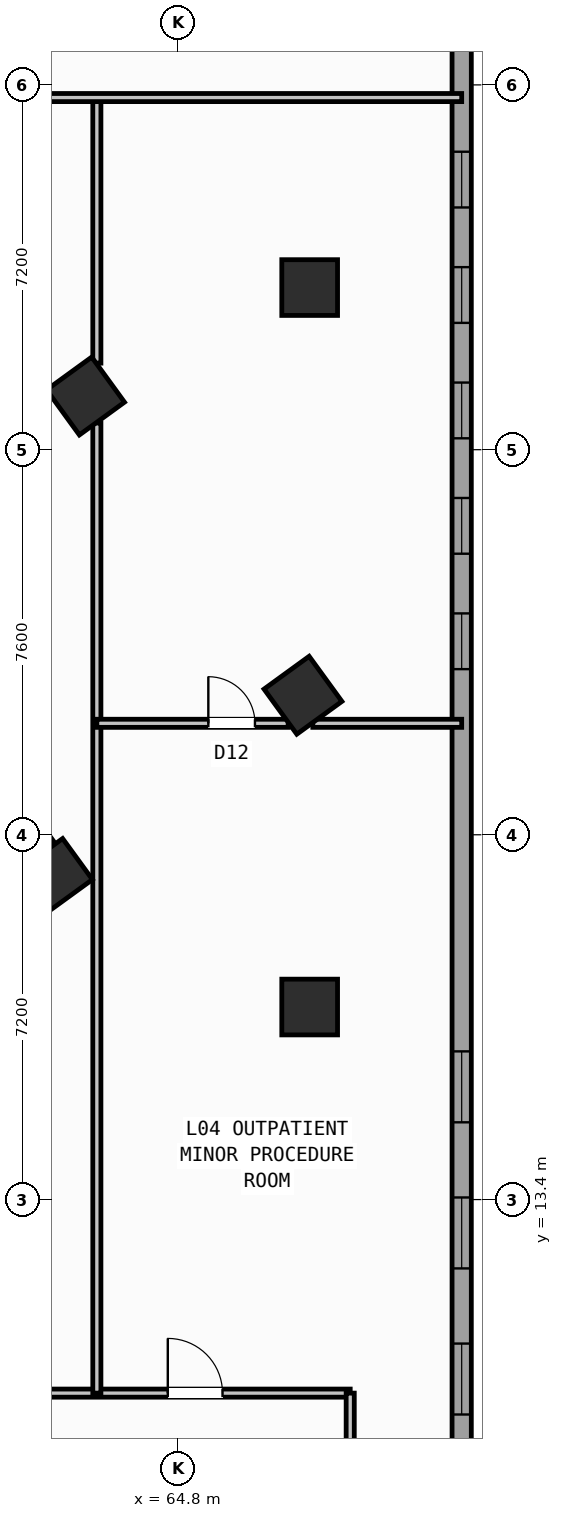
"""IFC4 building model, lengths in metres.
Left out: names, types, materials, properties, quantities, classifications, styles, units other than length and angle.
Written with IfcOpenShell. Run it as: python <this file> out.ifc"""

import sys

from ifc_helpers import new_model, si_unit, direction, frame, frame_2d, origin, origin_2d, place, context, subcontext, project, spatial, rectangle, hollow_rectangle, extrude, source, transform, mapped, element, fill, save


model = new_model("IFC4")
c1 = context("Model", 3, precision=1e-05, world=origin(), true_north=direction((0.0, 1.0)))
c2 = subcontext(c1, "Body", "Model", "MODEL_VIEW")
j1 = project(units=[si_unit("LENGTHUNIT", "METRE"), si_unit("PLANEANGLEUNIT", "RADIAN")], contexts=[c1])
p1 = place(None, origin())
s1 = spatial("IfcSite", under=j1, at=p1, CompositionType="ELEMENT")
p2 = place(p1, origin())
s2 = spatial("IfcBuilding", under=s1, at=p2, CompositionType="ELEMENT")
p3 = place(p2, frame((0.0, 0.0, 18.6)))
s3 = spatial("IfcBuildingStorey", under=s2, at=p3, CompositionType="ELEMENT", Elevation=18.6)
p4 = place(p3, frame((52.318, 13.11, 0.0), z_axis=(0.0, 0.0, 1.0), x_axis=(0.809019445368, 0.587781878776, 0.0)))
e1 = element("IfcWall", 1, at=p4, inside=s3, PredefinedType="SHEAR", context=c2, shape_type="SweptSolid", body=[
    extrude(rectangle(XDim=12.44, YDim=0.65, at=frame_2d((6.22, 0.0))), origin(), (0.0, 0.0, 1.0), 4.95),
])
m1 = source(origin(), c2, "Body", "SweptSolid", [
    extrude(hollow_rectangle(XDim=1.1, YDim=1.1, WallThickness=0.04, at=origin_2d()), origin(), (0.0, 0.0, 1.0), 5.4),
])
for number, where, z_axis, x_axis in (
    (2, (67.4, 17.2, 0.0), (0.0, 0.0, 1.0), (1.0, 0.0, 0.0)),
    (3, (67.4, 31.4, 0.0), (0.0, 0.0, 1.0), (1.0, 0.0, 0.0)),
    (4, (67.268, 23.354, 0.0), (0.0, 0.0, 1.0), (0.809, 0.588, 0.0)),
    (5, (62.977, 29.259, 0.0), (0.0, 0.0, 1.0), (0.809, 0.588, 0.0)),
):
    element("IfcColumn", number, at=place(p3, frame(where, z_axis=z_axis, x_axis=x_axis)), inside=s3, PredefinedType="COLUMN", context=c2, shape_type="MappedRepresentation", body=[
        mapped(m1, transform((0.0, 0.0, 0.0), scale=1.0)),
    ])
m2 = source(origin(), c2, "Body", "SweptSolid", [
    extrude(hollow_rectangle(XDim=1.0, YDim=1.0, WallThickness=0.04, at=origin_2d()), origin(), (0.0, 0.0, 1.0), 5.4),
])
p5 = place(p3, frame((62.414, 19.827, 0.0), z_axis=(0.0, 0.0, 1.0), x_axis=(0.809016994375, 0.587785252292, 0.0)))
e6 = element("IfcColumn", 6, at=p5, inside=s3, PredefinedType="COLUMN", context=c2, shape_type="MappedRepresentation", body=[
    mapped(m2, transform((0.0, 0.0, 0.0), scale=1.0)),
])
p6 = place(p3, frame((70.4, 43.117, 0.0), z_axis=(0.0, 0.0, 1.0), x_axis=(0.0, -1.0, 0.0)))
e7 = element("IfcWall", 7, at=p6, inside=s3, PredefinedType="STANDARD", context=c2, shape_type="SweptSolid", body=[
    extrude(rectangle(XDim=38.234, YDim=0.38, at=frame_2d((19.117, 0.0))), origin(), (0.0, 0.0, 1.0), 4.95),
])
p7 = place(p6, frame((1.259, 0.0, 0.85)))
e8 = element("IfcOpeningElement", 8, at=p7, cuts=e7, PredefinedType="OPENING", context=c2, shape_type="SweptSolid", body=[
    extrude(rectangle(XDim=2.2, YDim=1.75, at=frame_2d((1.1, 0.875))), frame((0.0, 0.2, 0.0), z_axis=(0.0, -1.0, 0.0), x_axis=(1.0, 0.0, 0.0)), (0.0, 0.0, 1.0), 0.4),
])
p8 = place(p6, frame((4.678, 0.0, 0.85)))
e9 = element("IfcOpeningElement", 9, at=p8, cuts=e7, PredefinedType="OPENING", context=c2, shape_type="SweptSolid", body=[
    extrude(rectangle(XDim=2.2, YDim=1.75, at=frame_2d((1.1, 0.875))), frame((0.0, 0.2, 0.0), z_axis=(0.0, -1.0, 0.0), x_axis=(1.0, 0.0, 0.0)), (0.0, 0.0, 1.0), 0.4),
])
p9 = place(p6, frame((9.036, 0.0, 1.0)))
e10 = element("IfcOpeningElement", 10, at=p9, cuts=e7, PredefinedType="OPENING", context=c2, shape_type="SweptSolid", body=[
    extrude(rectangle(XDim=1.1, YDim=1.35, at=frame_2d((0.55, 0.675))), frame((0.0, 0.2, 0.0), z_axis=(0.0, -1.0, 0.0), x_axis=(1.0, 0.0, 0.0)), (0.0, 0.0, 1.0), 0.4),
])
p10 = place(p6, frame((11.314, 0.0, 1.0)))
e11 = element("IfcOpeningElement", 11, at=p10, cuts=e7, PredefinedType="OPENING", context=c2, shape_type="SweptSolid", body=[
    extrude(rectangle(XDim=1.1, YDim=1.35, at=frame_2d((0.55, 0.675))), frame((0.0, 0.2, 0.0), z_axis=(0.0, -1.0, 0.0), x_axis=(1.0, 0.0, 0.0)), (0.0, 0.0, 1.0), 0.4),
])
p11 = place(p6, frame((13.592, 0.0, 1.0)))
e12 = element("IfcOpeningElement", 12, at=p11, cuts=e7, PredefinedType="OPENING", context=c2, shape_type="SweptSolid", body=[
    extrude(rectangle(XDim=1.1, YDim=1.35, at=frame_2d((0.55, 0.675))), frame((0.0, 0.2, 0.0), z_axis=(0.0, -1.0, 0.0), x_axis=(1.0, 0.0, 0.0)), (0.0, 0.0, 1.0), 0.4),
])
p12 = place(p6, frame((15.87, 0.0, 1.0)))
e13 = element("IfcOpeningElement", 13, at=p12, cuts=e7, PredefinedType="OPENING", context=c2, shape_type="SweptSolid", body=[
    extrude(rectangle(XDim=1.1, YDim=1.35, at=frame_2d((0.55, 0.675))), frame((0.0, 0.2, 0.0), z_axis=(0.0, -1.0, 0.0), x_axis=(1.0, 0.0, 0.0)), (0.0, 0.0, 1.0), 0.4),
])
p13 = place(p6, frame((18.148, 0.0, 1.0)))
e14 = element("IfcOpeningElement", 14, at=p13, cuts=e7, PredefinedType="OPENING", context=c2, shape_type="SweptSolid", body=[
    extrude(rectangle(XDim=1.1, YDim=1.35, at=frame_2d((0.55, 0.675))), frame((0.0, 0.2, 0.0), z_axis=(0.0, -1.0, 0.0), x_axis=(1.0, 0.0, 0.0)), (0.0, 0.0, 1.0), 0.4),
])
p14 = place(p6, frame((26.792, 0.0, 0.95)))
e15 = element("IfcOpeningElement", 15, at=p14, cuts=e7, PredefinedType="OPENING", context=c2, shape_type="SweptSolid", body=[
    extrude(rectangle(XDim=1.4, YDim=1.5, at=frame_2d((0.7, 0.75))), frame((0.0, 0.2, 0.0), z_axis=(0.0, -1.0, 0.0), x_axis=(1.0, 0.0, 0.0)), (0.0, 0.0, 1.0), 0.4),
])
p15 = place(p6, frame((29.676, 0.0, 0.95)))
e16 = element("IfcOpeningElement", 16, at=p15, cuts=e7, PredefinedType="OPENING", context=c2, shape_type="SweptSolid", body=[
    extrude(rectangle(XDim=1.4, YDim=1.5, at=frame_2d((0.7, 0.75))), frame((0.0, 0.2, 0.0), z_axis=(0.0, -1.0, 0.0), x_axis=(1.0, 0.0, 0.0)), (0.0, 0.0, 1.0), 0.4),
])
p16 = place(p6, frame((32.559, 0.0, 0.95)))
e17 = element("IfcOpeningElement", 17, at=p16, cuts=e7, PredefinedType="OPENING", context=c2, shape_type="SweptSolid", body=[
    extrude(rectangle(XDim=1.4, YDim=1.5, at=frame_2d((0.7, 0.75))), frame((0.0, 0.2, 0.0), z_axis=(0.0, -1.0, 0.0), x_axis=(1.0, 0.0, 0.0)), (0.0, 0.0, 1.0), 0.4),
])
p17 = place(p6, frame((35.443, 0.0, 0.95)))
e18 = element("IfcOpeningElement", 18, at=p17, cuts=e7, PredefinedType="OPENING", context=c2, shape_type="SweptSolid", body=[
    extrude(rectangle(XDim=1.4, YDim=1.5, at=frame_2d((0.7, 0.75))), frame((0.0, 0.2, 0.0), z_axis=(0.0, -1.0, 0.0), x_axis=(1.0, 0.0, 0.0)), (0.0, 0.0, 1.0), 0.4),
])
p18 = place(p3, frame((6.1, 9.58, 0.0), z_axis=(0.0, 0.0, 1.0), x_axis=(1.0, 0.0, 0.0)))
e19 = element("IfcWall", 19, at=p18, inside=s3, PredefinedType="PARTITIONING", context=c2, shape_type="SweptSolid", body=[
    extrude(rectangle(XDim=62.1, YDim=0.16, at=frame_2d((31.05, 0.0))), origin(), (0.0, 0.0, 1.0), 4.94),
])
p19 = place(p18, frame((29.0, 0.0, 0.0)))
e20 = element("IfcOpeningElement", 20, at=p19, cuts=e19, PredefinedType="OPENING", context=c2, shape_type="SweptSolid", body=[
    extrude(rectangle(XDim=1.7, YDim=2.2, at=frame_2d((0.85, 1.1))), frame((0.0, 0.09, 0.0), z_axis=(0.0, -1.0, 0.0), x_axis=(1.0, 0.0, 0.0)), (0.0, 0.0, 1.0), 0.18),
])
p20 = place(p18, frame((0.35, 0.0, 0.0)))
e21 = element("IfcOpeningElement", 21, at=p20, cuts=e19, PredefinedType="OPENING", context=c2, shape_type="SweptSolid", body=[
    extrude(rectangle(XDim=1.5, YDim=2.15, at=frame_2d((0.75, 1.075))), frame((0.0, 0.09, 0.0), z_axis=(0.0, -1.0, 0.0), x_axis=(1.0, 0.0, 0.0)), (0.0, 0.0, 1.0), 0.18),
])
p21 = place(p18, frame((5.2, 0.0, 0.0)))
e22 = element("IfcOpeningElement", 22, at=p21, cuts=e19, PredefinedType="OPENING", context=c2, shape_type="SweptSolid", body=[
    extrude(rectangle(XDim=1.08, YDim=2.15, at=frame_2d((0.54, 1.075))), frame((0.0, 0.09, 0.0), z_axis=(0.0, -1.0, 0.0), x_axis=(1.0, 0.0, 0.0)), (0.0, 0.0, 1.0), 0.18),
])
p22 = place(p18, frame((58.5, 0.0, 0.0)))
e23 = element("IfcOpeningElement", 23, at=p22, cuts=e19, PredefinedType="OPENING", context=c2, shape_type="SweptSolid", body=[
    extrude(rectangle(XDim=1.08, YDim=2.15, at=frame_2d((0.54, 1.075))), frame((0.0, 0.09, 0.0), z_axis=(0.0, -1.0, 0.0), x_axis=(1.0, 0.0, 0.0)), (0.0, 0.0, 1.0), 0.18),
])
p23 = place(p3, frame((63.2, 9.58, 0.0), z_axis=(0.0, 0.0, 1.0), x_axis=(0.0, 1.0, 0.0)))
e24 = element("IfcWall", 24, at=p23, inside=s3, PredefinedType="PARTITIONING", context=c2, shape_type="SweptSolid", body=[
    extrude(rectangle(XDim=19.147, YDim=0.16, at=frame_2d((9.573, 0.0))), origin(), (0.0, 0.0, 1.0), 4.94),
])
p24 = place(p3, frame((63.2, 29.908, 0.0), z_axis=(0.0, 0.0, 1.0), x_axis=(0.0, 1.0, 0.0)))
e25 = element("IfcWall", 25, at=p24, inside=s3, PredefinedType="PARTITIONING", context=c2, shape_type="SweptSolid", body=[
    extrude(rectangle(XDim=5.241, YDim=0.16, at=frame_2d((2.621, 0.0))), origin(), (0.0, 0.0, 1.0), 4.94),
])
p25 = place(p3, frame((59.392, 35.15, 0.0), z_axis=(0.0, 0.0, 1.0), x_axis=(1.0, 0.0, 0.0)))
e26 = element("IfcWall", 26, at=p25, inside=s3, PredefinedType="PARTITIONING", context=c2, shape_type="SweptSolid", body=[
    extrude(rectangle(XDim=11.008, YDim=0.16, at=frame_2d((5.504, 0.0))), origin(), (0.0, 0.0, 1.0), 4.94),
])
p26 = place(p3, frame((68.2, 7.62, 0.0), z_axis=(0.0, 0.0, 1.0), x_axis=(0.0, 1.0, 0.0)))
e27 = element("IfcWall", 27, at=p26, inside=s3, PredefinedType="PARTITIONING", context=c2, shape_type="SweptSolid", body=[
    extrude(rectangle(XDim=1.96, YDim=0.16, at=frame_2d((0.98, 0.0))), origin(), (0.0, 0.0, 1.0), 4.94),
])
p27 = place(p3, frame((63.2, 22.8, 0.0), z_axis=(0.0, 0.0, 1.0), x_axis=(1.0, 0.0, 0.0)))
e28 = element("IfcWall", 28, at=p27, inside=s3, PredefinedType="PARTITIONING", context=c2, shape_type="SweptSolid", body=[
    extrude(rectangle(XDim=3.775, YDim=0.16, at=frame_2d((1.888, 0.0))), origin(), (0.0, 0.0, 1.0), 4.94),
])
p28 = place(p27, frame((2.2, 0.0, 0.0)))
e29 = element("IfcOpeningElement", 29, at=p28, cuts=e28, PredefinedType="OPENING", context=c2, shape_type="SweptSolid", body=[
    extrude(rectangle(XDim=0.92, YDim=2.08, at=frame_2d((0.46, 1.04))), frame((0.0, 0.09, 0.0), z_axis=(0.0, -1.0, 0.0), x_axis=(1.0, 0.0, 0.0)), (0.0, 0.0, 1.0), 0.18),
])
p29 = place(p3, frame((67.462, 22.8, 0.0), z_axis=(0.0, 0.0, 1.0), x_axis=(1.0, 0.0, 0.0)))
e30 = element("IfcWall", 30, at=p29, inside=s3, PredefinedType="PARTITIONING", context=c2, shape_type="SweptSolid", body=[
    extrude(rectangle(XDim=2.938, YDim=0.16, at=frame_2d((1.469, 0.0))), origin(), (0.0, 0.0, 1.0), 4.94),
])
m3 = source(origin(), c2, "Body", "SweptSolid", [
    extrude(rectangle(XDim=1.1, YDim=1.35, at=frame_2d((0.55, 0.675))), frame((0.0, 0.03, 0.0), z_axis=(0.0, -1.0, 0.0), x_axis=(1.0, 0.0, 0.0)), (0.0, 0.0, 1.0), 0.06),
])
p30 = place(p9, origin())
e31 = element("IfcWindow", 31, at=p30, inside=s3, PartitioningType="SINGLE_PANEL", PredefinedType="WINDOW", context=c2, shape_type="MappedRepresentation", body=[
    mapped(m3, transform((0.0, 0.0, 0.0), scale=1.0)),
])
fill(e10, e31)
p31 = place(p10, origin())
e32 = element("IfcWindow", 32, at=p31, inside=s3, PartitioningType="SINGLE_PANEL", PredefinedType="WINDOW", context=c2, shape_type="MappedRepresentation", body=[
    mapped(m3, transform((0.0, 0.0, 0.0), scale=1.0)),
])
fill(e11, e32)
p32 = place(p11, origin())
e33 = element("IfcWindow", 33, at=p32, inside=s3, PartitioningType="SINGLE_PANEL", PredefinedType="WINDOW", context=c2, shape_type="MappedRepresentation", body=[
    mapped(m3, transform((0.0, 0.0, 0.0), scale=1.0)),
])
fill(e12, e33)
p33 = place(p12, origin())
e34 = element("IfcWindow", 34, at=p33, inside=s3, PartitioningType="SINGLE_PANEL", PredefinedType="WINDOW", context=c2, shape_type="MappedRepresentation", body=[
    mapped(m3, transform((0.0, 0.0, 0.0), scale=1.0)),
])
fill(e13, e34)
p34 = place(p13, origin())
e35 = element("IfcWindow", 35, at=p34, inside=s3, PartitioningType="SINGLE_PANEL", PredefinedType="WINDOW", context=c2, shape_type="MappedRepresentation", body=[
    mapped(m3, transform((0.0, 0.0, 0.0), scale=1.0)),
])
fill(e14, e35)
m4 = source(origin(), c2, "Body", "SweptSolid", [
    extrude(rectangle(XDim=1.4, YDim=1.5, at=frame_2d((0.7, 0.75))), frame((0.0, 0.03, 0.0), z_axis=(0.0, -1.0, 0.0), x_axis=(1.0, 0.0, 0.0)), (0.0, 0.0, 1.0), 0.06),
])
p35 = place(p14, origin())
e36 = element("IfcWindow", 36, at=p35, inside=s3, PartitioningType="SINGLE_PANEL", PredefinedType="WINDOW", context=c2, shape_type="MappedRepresentation", body=[
    mapped(m4, transform((0.0, 0.0, 0.0), scale=1.0)),
])
fill(e15, e36)
p36 = place(p15, origin())
e37 = element("IfcWindow", 37, at=p36, inside=s3, PartitioningType="SINGLE_PANEL", PredefinedType="WINDOW", context=c2, shape_type="MappedRepresentation", body=[
    mapped(m4, transform((0.0, 0.0, 0.0), scale=1.0)),
])
fill(e16, e37)
p37 = place(p16, origin())
e38 = element("IfcWindow", 38, at=p37, inside=s3, PartitioningType="SINGLE_PANEL", PredefinedType="WINDOW", context=c2, shape_type="MappedRepresentation", body=[
    mapped(m4, transform((0.0, 0.0, 0.0), scale=1.0)),
])
fill(e17, e38)
m5 = source(origin(), c2, "Body", "SweptSolid", [
    extrude(rectangle(XDim=1.08, YDim=2.15, at=frame_2d((0.54, 1.075))), frame((0.0, 0.025, 0.0), z_axis=(0.0, -1.0, 0.0), x_axis=(1.0, 0.0, 0.0)), (0.0, 0.0, 1.0), 0.05),
])
p38 = place(p22, origin())
e39 = element("IfcDoor", 39, at=p38, inside=s3, OperationType="SINGLE_SWING_LEFT", PredefinedType="DOOR", context=c2, shape_type="MappedRepresentation", body=[
    mapped(m5, transform((0.0, 0.0, 0.0), scale=1.0)),
])
fill(e23, e39)
m6 = source(origin(), c2, "Body", "SweptSolid", [
    extrude(rectangle(XDim=0.92, YDim=2.08, at=frame_2d((0.46, 1.04))), frame((0.0, 0.025, 0.0), z_axis=(0.0, -1.0, 0.0), x_axis=(1.0, 0.0, 0.0)), (0.0, 0.0, 1.0), 0.05),
])
p39 = place(p28, origin())
e40 = element("IfcDoor", 40, at=p39, inside=s3, OperationType="SINGLE_SWING_LEFT", PredefinedType="DOOR", context=c2, shape_type="MappedRepresentation", body=[
    mapped(m6, transform((0.0, 0.0, 0.0), scale=1.0)),
])
fill(e29, e40)
save(model, sys.argv[1])
